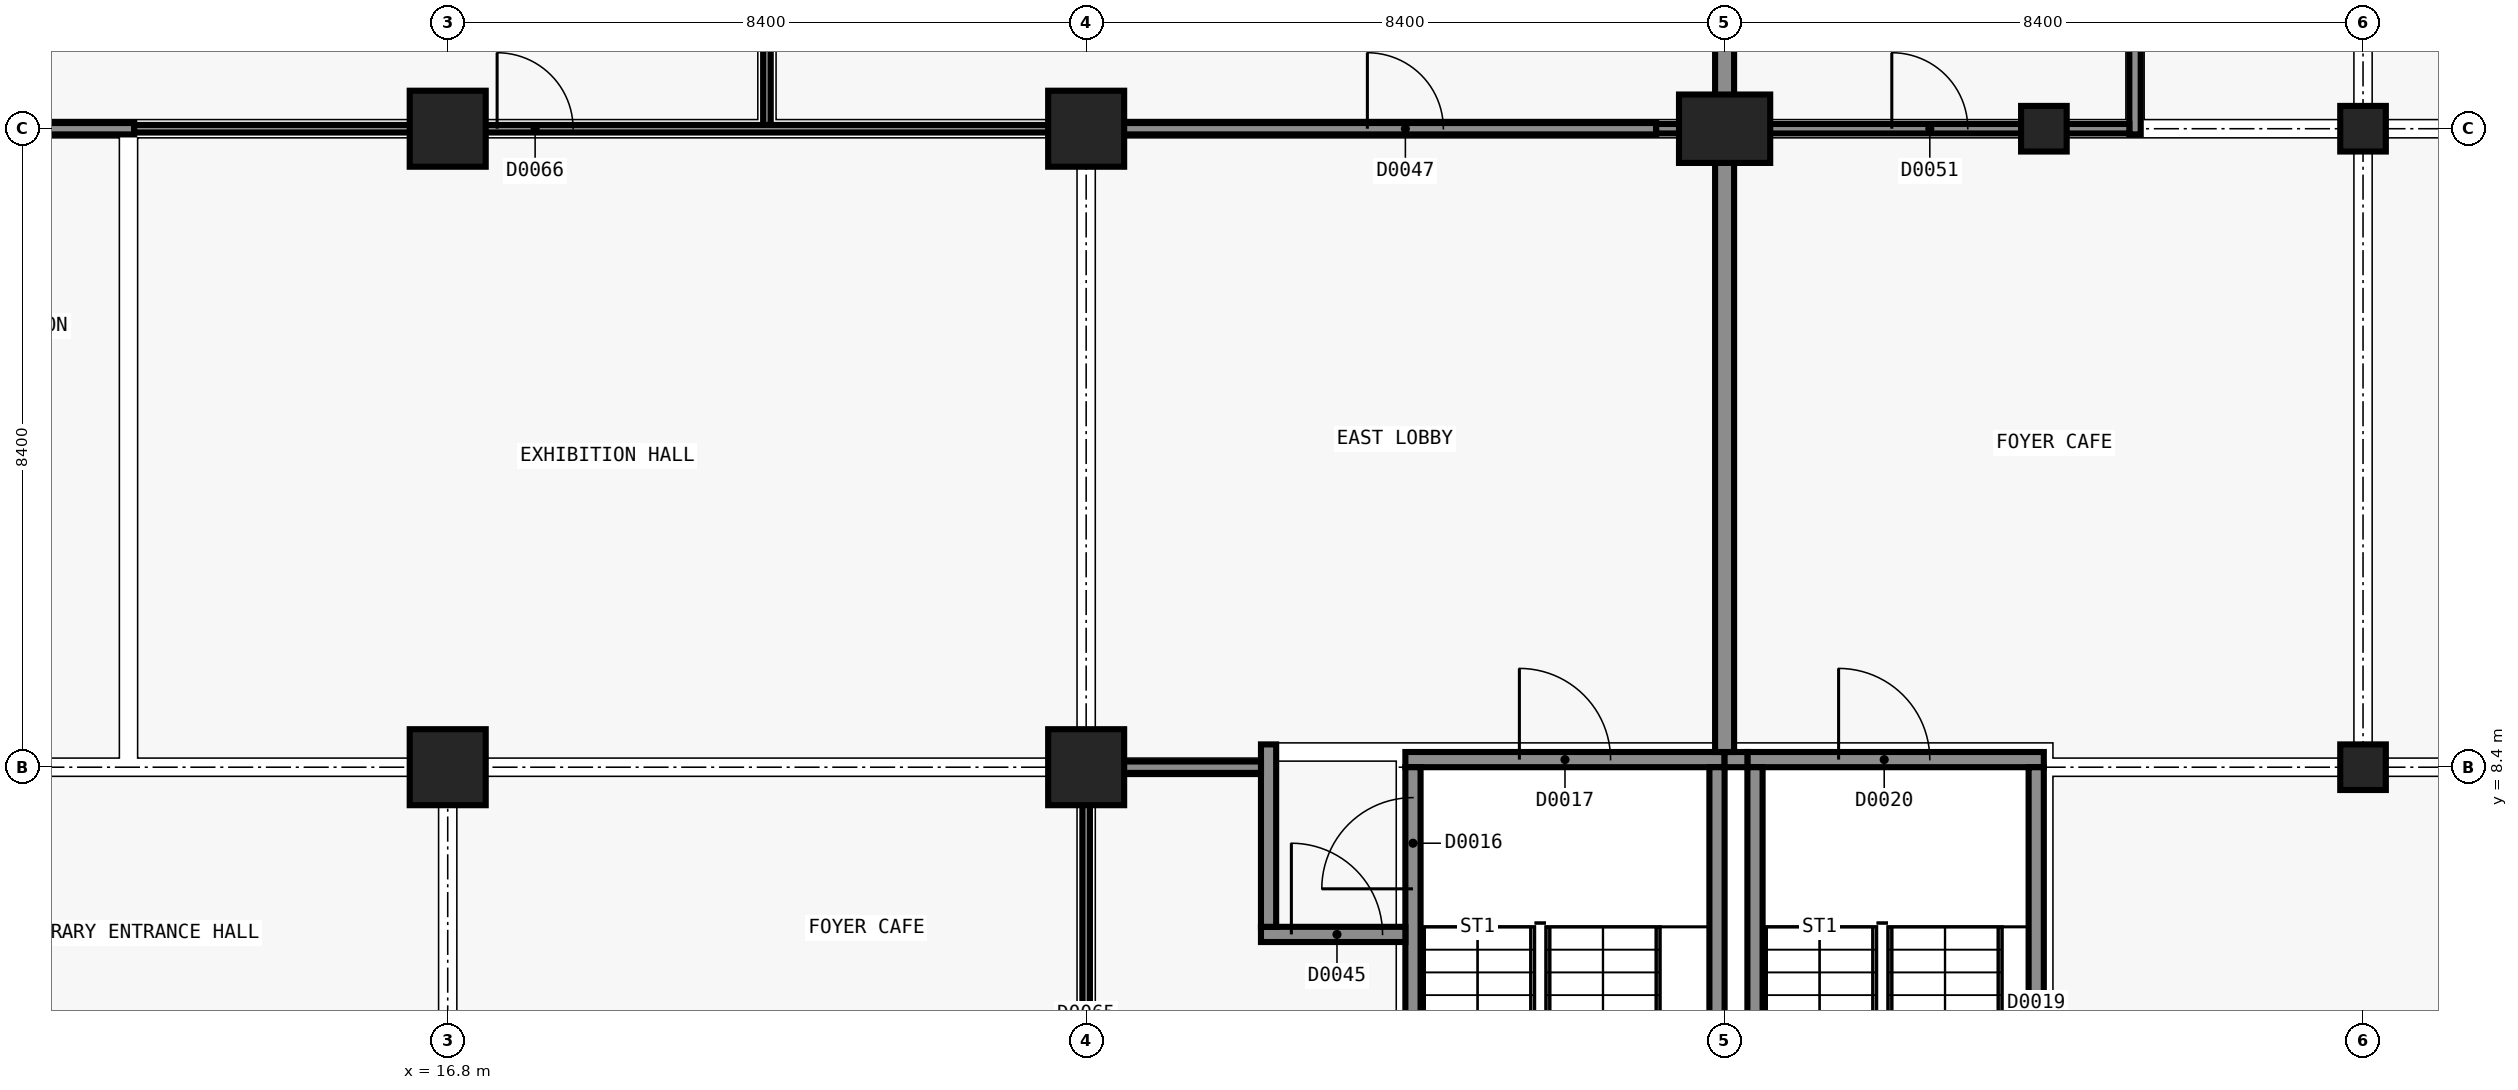
"""IFC4 building model, lengths in metres.
Left out: names, types, materials, properties, quantities, classifications, styles, units other than length and angle.
Written with IfcOpenShell. Run it as: python <this file> out.ifc"""

import sys

from ifc_helpers import new_model, si_unit, direction, frame, frame_2d, origin, origin_2d, place, context, subcontext, project, spatial, rectangle, extrude, element, fill, save


model = new_model("IFC4")
c1 = context("Model", 3, precision=1e-05, world=origin(), true_north=direction((0.0, 1.0)))
c2 = subcontext(c1, "Body", "Model", "MODEL_VIEW")
j1 = project(units=[si_unit("LENGTHUNIT", "METRE"), si_unit("PLANEANGLEUNIT", "RADIAN")], contexts=[c1])
p1 = place(None, origin())
s1 = spatial("IfcSite", under=j1, at=p1, CompositionType="ELEMENT")
p2 = place(p1, origin())
s2 = spatial("IfcBuilding", under=s1, at=p2, CompositionType="ELEMENT")
p3 = place(p2, origin())
s3 = spatial("IfcBuildingStorey", under=s2, at=p3, CompositionType="ELEMENT", Elevation=0.0)
p4 = place(p3, frame((29.4, 8.5, -0.3), z_axis=(0.0, 0.0, 1.0), x_axis=(1.0, 0.0, 0.0)))
e1 = element("IfcWall", 1, at=p4, inside=s3, PredefinedType="SHEAR", context=c2, shape_type="SweptSolid", body=[
    extrude(rectangle(XDim=4.2, YDim=0.2, at=frame_2d((2.1, 0.0))), origin(), (0.0, 0.0, 1.0), 5.7),
])
p5 = place(p4, frame((1.5, 0.0, 0.3)))
e2 = element("IfcOpeningElement", 2, at=p5, cuts=e1, PredefinedType="OPENING", context=c2, shape_type="SweptSolid", body=[
    extrude(rectangle(XDim=1.2, YDim=2.1, at=frame_2d((0.6, 1.05))), frame((0.0, 0.11, 0.0), z_axis=(0.0, -1.0, 0.0), x_axis=(1.0, 0.0, 0.0)), (0.0, 0.0, 1.0), 0.22),
])
p6 = place(p3, frame((29.5, 0.2, -0.3), z_axis=(0.0, 0.0, 1.0), x_axis=(0.0, 1.0, 0.0)))
e3 = element("IfcWall", 3, at=p6, inside=s3, PredefinedType="SHEAR", context=c2, shape_type="SweptSolid", body=[
    extrude(rectangle(XDim=8.2, YDim=0.2, at=frame_2d((4.1, 0.0))), origin(), (0.0, 0.0, 1.0), 5.7),
])
p7 = place(p6, frame((6.6, 0.0, 0.3)))
e4 = element("IfcOpeningElement", 4, at=p7, cuts=e3, PredefinedType="OPENING", context=c2, shape_type="SweptSolid", body=[
    extrude(rectangle(XDim=1.2, YDim=2.1, at=frame_2d((0.6, 1.05))), frame((0.0, 0.11, 0.0), z_axis=(0.0, -1.0, 0.0), x_axis=(1.0, 0.0, 0.0)), (0.0, 0.0, 1.0), 0.22),
])
p8 = place(p3, frame((33.5, 8.4, -0.3), z_axis=(0.0, 0.0, 1.0), x_axis=(0.0, -1.0, 0.0)))
e5 = element("IfcWall", 5, at=p8, inside=s3, PredefinedType="SHEAR", context=c2, shape_type="SweptSolid", body=[
    extrude(rectangle(XDim=8.2, YDim=0.2, at=frame_2d((4.1, 0.0))), origin(), (0.0, 0.0, 1.0), 5.7),
])
p9 = place(p3, frame((33.9, 8.5, -0.3), z_axis=(0.0, 0.0, 1.0), x_axis=(1.0, 0.0, 0.0)))
e6 = element("IfcWall", 6, at=p9, inside=s3, PredefinedType="SHEAR", context=c2, shape_type="SweptSolid", body=[
    extrude(rectangle(XDim=3.9, YDim=0.2, at=frame_2d((1.95, 0.0))), origin(), (0.0, 0.0, 1.0), 5.7),
])
p10 = place(p9, frame((1.2, 0.0, 0.3)))
e7 = element("IfcOpeningElement", 7, at=p10, cuts=e6, PredefinedType="OPENING", context=c2, shape_type="SweptSolid", body=[
    extrude(rectangle(XDim=1.2, YDim=2.1, at=frame_2d((0.6, 1.05))), frame((0.0, 0.11, 0.0), z_axis=(0.0, -1.0, 0.0), x_axis=(1.0, 0.0, 0.0)), (0.0, 0.0, 1.0), 0.22),
])
p11 = place(p3, frame((34.0, 0.2, -0.3), z_axis=(0.0, 0.0, 1.0), x_axis=(0.0, 1.0, 0.0)))
e8 = element("IfcWall", 8, at=p11, inside=s3, PredefinedType="SHEAR", context=c2, shape_type="SweptSolid", body=[
    extrude(rectangle(XDim=8.2, YDim=0.2, at=frame_2d((4.1, 0.0))), origin(), (0.0, 0.0, 1.0), 5.7),
])
p12 = place(p3, frame((37.7, 8.4, -0.3), z_axis=(0.0, 0.0, 1.0), x_axis=(0.0, -1.0, 0.0)))
e9 = element("IfcWall", 9, at=p12, inside=s3, PredefinedType="SHEAR", context=c2, shape_type="SweptSolid", body=[
    extrude(rectangle(XDim=8.2, YDim=0.2, at=frame_2d((4.1, 0.0))), origin(), (0.0, 0.0, 1.0), 5.7),
])
p13 = place(p12, frame((3.6, 0.0, 0.3)))
e10 = element("IfcOpeningElement", 10, at=p13, cuts=e9, PredefinedType="OPENING", context=c2, shape_type="SweptSolid", body=[
    extrude(rectangle(XDim=1.2, YDim=2.1, at=frame_2d((0.6, 1.05))), frame((0.0, 0.11, 0.0), z_axis=(0.0, -1.0, 0.0), x_axis=(1.0, 0.0, 0.0)), (0.0, 0.0, 1.0), 0.22),
])
for number, where, z_axis, x_axis in (
    (11, (16.8, 8.4, -0.3), (0.0, 0.0, 1.0), (1.0, 0.0, 0.0)),
    (12, (16.8, 16.8, -0.3), (0.0, 0.0, 1.0), (1.0, 0.0, 0.0)),
    (13, (25.2, 8.4, -0.3), (0.0, 0.0, 1.0), (1.0, 0.0, 0.0)),
    (14, (25.2, 16.8, -0.3), (0.0, 0.0, 1.0), (1.0, 0.0, 0.0)),
):
    element("IfcColumn", number, at=place(p3, frame(where, z_axis=z_axis, x_axis=x_axis)), inside=s3, PredefinedType="COLUMN", context=c2, shape_type="SweptSolid", body=[
        extrude(rectangle(XDim=1.0, YDim=1.0, at=origin_2d()), origin(), (0.0, 0.0, 1.0), 5.7),
    ])
p14 = place(p3, frame((33.6, 16.8, -0.3), z_axis=(0.0, 0.0, 1.0), x_axis=(0.0, 1.0, 0.0)))
e15 = element("IfcColumn", 15, at=p14, inside=s3, PredefinedType="COLUMN", context=c2, shape_type="SweptSolid", body=[
    extrude(rectangle(XDim=1.2, YDim=0.9, at=origin_2d()), origin(), (0.0, 0.0, 1.0), 5.7),
])
for number, where, z_axis, x_axis in (
    (16, (42.0, 8.4, -0.3), (0.0, 0.0, 1.0), (1.0, 0.0, 0.0)),
    (17, (42.0, 16.8, -0.3), (0.0, 0.0, 1.0), (1.0, 0.0, 0.0)),
):
    element("IfcColumn", number, at=place(p3, frame(where, z_axis=z_axis, x_axis=x_axis)), inside=s3, PredefinedType="COLUMN", context=c2, shape_type="SweptSolid", body=[
        extrude(rectangle(XDim=0.6, YDim=0.6, at=origin_2d()), origin(), (0.0, 0.0, 1.0), 5.7),
    ])
p15 = place(p3, frame((33.6, 8.5, -0.3), z_axis=(0.0, 0.0, 1.0), x_axis=(1.0, 0.0, 0.0)))
e18 = element("IfcWall", 18, at=p15, inside=s3, PredefinedType="SHEAR", context=c2, shape_type="SweptSolid", body=[
    extrude(rectangle(XDim=0.3, YDim=0.2, at=frame_2d((0.15, 0.0))), origin(), (0.0, 0.0, 1.0), 5.7),
])
p16 = place(p3, frame((37.801, 16.8, -0.3), z_axis=(0.0, 0.0, 1.0), x_axis=(1.0, 0.0, 0.0)))
e19 = element("IfcColumn", 19, at=p16, inside=s3, PredefinedType="COLUMN", context=c2, shape_type="SweptSolid", body=[
    extrude(rectangle(XDim=0.6, YDim=0.6, at=origin_2d()), origin(), (0.0, 0.0, 1.0), 5.7),
])
p17 = place(p3, frame((33.6, 8.6, 0.0), z_axis=(0.0, 0.0, 1.0), x_axis=(0.0, 1.0, 0.0)))
e20 = element("IfcWall", 20, at=p17, inside=s3, PredefinedType="SOLIDWALL", context=c2, shape_type="SweptSolid", body=[
    extrude(rectangle(XDim=15.85, YDim=0.25, at=frame_2d((7.925, 0.0))), origin(), (0.0, 0.0, 1.0), 4.4),
])
p18 = place(p3, frame((27.5, 6.2, 0.0), z_axis=(0.0, 0.0, 1.0), x_axis=(1.0, 0.0, 0.0)))
e21 = element("IfcWall", 21, at=p18, inside=s3, PredefinedType="SOLIDWALL", context=c2, shape_type="SweptSolid", body=[
    extrude(rectangle(XDim=1.9, YDim=0.2, at=frame_2d((0.95, 0.0))), origin(), (0.0, 0.0, 1.0), 5.1),
])
p19 = place(p18, frame((0.4, 0.0, 0.0)))
e22 = element("IfcOpeningElement", 22, at=p19, cuts=e21, PredefinedType="OPENING", context=c2, shape_type="SweptSolid", body=[
    extrude(rectangle(XDim=1.2, YDim=2.1, at=frame_2d((0.6, 1.05))), frame((0.0, 0.11, 0.0), z_axis=(0.0, -1.0, 0.0), x_axis=(1.0, 0.0, 0.0)), (0.0, 0.0, 1.0), 0.22),
])
p20 = place(p3, frame((27.6, 6.3, 0.0), z_axis=(0.0, 0.0, 1.0), x_axis=(0.0, 1.0, 0.0)))
e23 = element("IfcWall", 23, at=p20, inside=s3, PredefinedType="SOLIDWALL", context=c2, shape_type="SweptSolid", body=[
    extrude(rectangle(XDim=2.4, YDim=0.2, at=frame_2d((1.2, 0.0))), origin(), (0.0, 0.0, 1.0), 4.6),
])
p21 = place(p3, frame((25.125, 8.4, 0.0), z_axis=(0.0, 0.0, 1.0), x_axis=(1.0, 0.0, 0.0)))
e24 = element("IfcWall", 24, at=p21, inside=s3, PredefinedType="PARTITIONING", context=c2, shape_type="SweptSolid", body=[
    extrude(rectangle(XDim=2.375, YDim=0.15, at=frame_2d((1.188, 0.0))), origin(), (0.0, 0.0, 1.0), 4.4),
])
p22 = place(p3, frame((8.325, 16.8, 0.0), z_axis=(0.0, 0.0, 1.0), x_axis=(1.0, 0.0, 0.0)))
e25 = element("IfcWall", 25, at=p22, inside=s3, PredefinedType="PARTITIONING", context=c2, shape_type="SweptSolid", body=[
    extrude(rectangle(XDim=4.35, YDim=0.15, at=frame_2d((2.175, 0.0))), origin(), (0.0, 0.0, 1.0), 4.4),
])
p23 = place(p3, frame((25.125, 16.8, 0.0), z_axis=(0.0, 0.0, 1.0), x_axis=(1.0, 0.0, 0.0)))
e26 = element("IfcWall", 26, at=p23, inside=s3, PredefinedType="PARTITIONING", context=c2, shape_type="SweptSolid", body=[
    extrude(rectangle(XDim=7.575, YDim=0.15, at=frame_2d((3.788, 0.0))), origin(), (0.0, 0.0, 1.0), 4.4),
])
p24 = place(p23, frame((3.775, 0.0, 0.0)))
e27 = element("IfcOpeningElement", 27, at=p24, cuts=e26, PredefinedType="OPENING", context=c2, shape_type="SweptSolid", body=[
    extrude(rectangle(XDim=1.0, YDim=2.1, at=frame_2d((0.5, 1.05))), frame((0.0, 0.085, 0.0), z_axis=(0.0, -1.0, 0.0), x_axis=(1.0, 0.0, 0.0)), (0.0, 0.0, 1.0), 0.17),
])
p25 = place(p3, frame((39.0, 16.725, 0.0), z_axis=(0.0, 0.0, 1.0), x_axis=(0.0, 1.0, 0.0)))
e28 = element("IfcWall", 28, at=p25, inside=s3, PredefinedType="PARTITIONING", context=c2, shape_type="SweptSolid", body=[
    extrude(rectangle(XDim=8.475, YDim=0.15, at=frame_2d((4.237, 0.0))), origin(), (0.0, 0.0, 1.0), 4.6),
])
p26 = place(p25, frame((3.975, 0.0, 0.0)))
e29 = element("IfcOpeningElement", 29, at=p26, cuts=e28, PredefinedType="OPENING", context=c2, shape_type="SweptSolid", body=[
    extrude(rectangle(XDim=1.0, YDim=2.1, at=frame_2d((0.5, 1.05))), frame((0.0, 0.085, 0.0), z_axis=(0.0, -1.0, 0.0), x_axis=(1.0, 0.0, 0.0)), (0.0, 0.0, 1.0), 0.17),
])
p27 = place(p25, frame((6.525, 0.0, 0.0)))
e30 = element("IfcOpeningElement", 30, at=p27, cuts=e28, PredefinedType="OPENING", context=c2, shape_type="SweptSolid", body=[
    extrude(rectangle(XDim=1.0, YDim=2.1, at=frame_2d((0.5, 1.05))), frame((0.0, 0.085, 0.0), z_axis=(0.0, -1.0, 0.0), x_axis=(1.0, 0.0, 0.0)), (0.0, 0.0, 1.0), 0.17),
])
p28 = place(p3, frame((32.7, 16.8, 0.0), z_axis=(0.0, 0.0, 1.0), x_axis=(1.0, 0.0, 0.0)))
e31 = element("IfcWall", 31, at=p28, inside=s3, PredefinedType="PARTITIONING", context=c2, shape_type="SweptSolid", body=[
    extrude(rectangle(XDim=0.775, YDim=0.125, at=frame_2d((0.388, 0.0))), origin(), (0.0, 0.0, 1.0), 4.4),
])
p29 = place(p3, frame((33.725, 16.8, 0.0), z_axis=(0.0, 0.0, 1.0), x_axis=(1.0, 0.0, 0.0)))
e32 = element("IfcWall", 32, at=p29, inside=s3, PredefinedType="PARTITIONING", context=c2, shape_type="SweptSolid", body=[
    extrude(rectangle(XDim=5.2, YDim=0.125, at=frame_2d((2.6, 0.0))), origin(), (0.0, 0.0, 1.0), 4.4),
])
p30 = place(p29, frame((2.075, 0.0, 0.0)))
e33 = element("IfcOpeningElement", 33, at=p30, cuts=e32, PredefinedType="OPENING", context=c2, shape_type="SweptSolid", body=[
    extrude(rectangle(XDim=1.0, YDim=2.1, at=frame_2d((0.5, 1.05))), frame((0.0, 0.073, 0.0), z_axis=(0.0, -1.0, 0.0), x_axis=(1.0, 0.0, 0.0)), (0.0, 0.0, 1.0), 0.145),
])
p31 = place(p3, frame((12.675, 16.8, 0.0), z_axis=(0.0, 0.0, 1.0), x_axis=(1.0, 0.0, 0.0)))
e34 = element("IfcWall", 34, at=p31, inside=s3, PredefinedType="PARTITIONING", context=c2, shape_type="SweptSolid", body=[
    extrude(rectangle(XDim=12.45, YDim=0.1, at=frame_2d((6.225, 0.0))), origin(), (0.0, 0.0, 1.0), 4.4),
])
p32 = place(p31, frame((4.775, 0.0, 0.0)))
e35 = element("IfcOpeningElement", 35, at=p32, cuts=e34, PredefinedType="OPENING", context=c2, shape_type="SweptSolid", body=[
    extrude(rectangle(XDim=1.0, YDim=2.1, at=frame_2d((0.5, 1.05))), frame((0.0, 0.06, 0.0), z_axis=(0.0, -1.0, 0.0), x_axis=(1.0, 0.0, 0.0)), (0.0, 0.0, 1.0), 0.12),
])
p33 = place(p3, frame((21.0, 16.85, 0.0), z_axis=(0.0, 0.0, 1.0), x_axis=(0.0, 1.0, 0.0)))
e36 = element("IfcWall", 36, at=p33, inside=s3, PredefinedType="PARTITIONING", context=c2, shape_type="SweptSolid", body=[
    extrude(rectangle(XDim=7.15, YDim=0.1, at=frame_2d((3.575, 0.0))), origin(), (0.0, 0.0, 1.0), 4.4),
])
p34 = place(p3, frame((25.2, 1.2, 0.0), z_axis=(0.0, 0.0, 1.0), x_axis=(0.0, 1.0, 0.0)))
e37 = element("IfcWall", 37, at=p34, inside=s3, PredefinedType="PARTITIONING", context=c2, shape_type="SweptSolid", body=[
    extrude(rectangle(XDim=7.125, YDim=0.1, at=frame_2d((3.562, 0.0))), origin(), (0.0, 0.0, 1.0), 4.4),
])
p35 = place(p34, frame((2.65, 0.0, 0.0)))
e38 = element("IfcOpeningElement", 38, at=p35, cuts=e37, PredefinedType="OPENING", context=c2, shape_type="SweptSolid", body=[
    extrude(rectangle(XDim=1.0, YDim=2.1, at=frame_2d((0.5, 1.05))), frame((0.0, 0.06, 0.0), z_axis=(0.0, -1.0, 0.0), x_axis=(1.0, 0.0, 0.0)), (0.0, 0.0, 1.0), 0.12),
])
p36 = place(p7, origin())
e39 = element("IfcDoor", 39, at=p36, inside=s3, OperationType="SINGLE_SWING_RIGHT", PredefinedType="DOOR", context=c2, shape_type="SweptSolid", body=[
    extrude(rectangle(XDim=1.2, YDim=2.1, at=frame_2d((0.6, 1.05))), frame((0.0, 0.025, 0.0), z_axis=(0.0, -1.0, 0.0), x_axis=(1.0, 0.0, 0.0)), (0.0, 0.0, 1.0), 0.05),
])
fill(e4, e39)
p37 = place(p5, origin())
e40 = element("IfcDoor", 40, at=p37, inside=s3, OperationType="SINGLE_SWING_RIGHT", PredefinedType="DOOR", context=c2, shape_type="SweptSolid", body=[
    extrude(rectangle(XDim=1.2, YDim=2.1, at=frame_2d((0.6, 1.05))), frame((0.0, 0.025, 0.0), z_axis=(0.0, -1.0, 0.0), x_axis=(1.0, 0.0, 0.0)), (0.0, 0.0, 1.0), 0.05),
])
fill(e2, e40)
p38 = place(p10, origin())
e41 = element("IfcDoor", 41, at=p38, inside=s3, OperationType="SINGLE_SWING_RIGHT", PredefinedType="DOOR", context=c2, shape_type="SweptSolid", body=[
    extrude(rectangle(XDim=1.2, YDim=2.1, at=frame_2d((0.6, 1.05))), frame((0.0, 0.025, 0.0), z_axis=(0.0, -1.0, 0.0), x_axis=(1.0, 0.0, 0.0)), (0.0, 0.0, 1.0), 0.05),
])
fill(e7, e41)
p39 = place(p19, origin())
e42 = element("IfcDoor", 42, at=p39, inside=s3, OperationType="SINGLE_SWING_RIGHT", PredefinedType="DOOR", context=c2, shape_type="SweptSolid", body=[
    extrude(rectangle(XDim=1.2, YDim=2.1, at=frame_2d((0.6, 1.05))), frame((0.0, 0.025, 0.0), z_axis=(0.0, -1.0, 0.0), x_axis=(1.0, 0.0, 0.0)), (0.0, 0.0, 1.0), 0.05),
])
fill(e22, e42)
p40 = place(p24, origin())
e43 = element("IfcDoor", 43, at=p40, inside=s3, OperationType="SINGLE_SWING_LEFT", PredefinedType="DOOR", context=c2, shape_type="SweptSolid", body=[
    extrude(rectangle(XDim=1.0, YDim=2.1, at=frame_2d((0.5, 1.05))), frame((0.0, 0.025, 0.0), z_axis=(0.0, -1.0, 0.0), x_axis=(1.0, 0.0, 0.0)), (0.0, 0.0, 1.0), 0.05),
])
fill(e27, e43)
p41 = place(p30, origin())
e44 = element("IfcDoor", 44, at=p41, inside=s3, OperationType="SINGLE_SWING_LEFT", PredefinedType="DOOR", context=c2, shape_type="SweptSolid", body=[
    extrude(rectangle(XDim=1.0, YDim=2.1, at=frame_2d((0.5, 1.05))), frame((0.0, 0.025, 0.0), z_axis=(0.0, -1.0, 0.0), x_axis=(1.0, 0.0, 0.0)), (0.0, 0.0, 1.0), 0.05),
])
fill(e33, e44)
p42 = place(p32, origin())
e45 = element("IfcDoor", 45, at=p42, inside=s3, OperationType="SINGLE_SWING_RIGHT", PredefinedType="DOOR", context=c2, shape_type="SweptSolid", body=[
    extrude(rectangle(XDim=1.0, YDim=2.1, at=frame_2d((0.5, 1.05))), frame((0.0, 0.025, 0.0), z_axis=(0.0, -1.0, 0.0), x_axis=(1.0, 0.0, 0.0)), (0.0, 0.0, 1.0), 0.05),
])
fill(e35, e45)
save(model, sys.argv[1])
